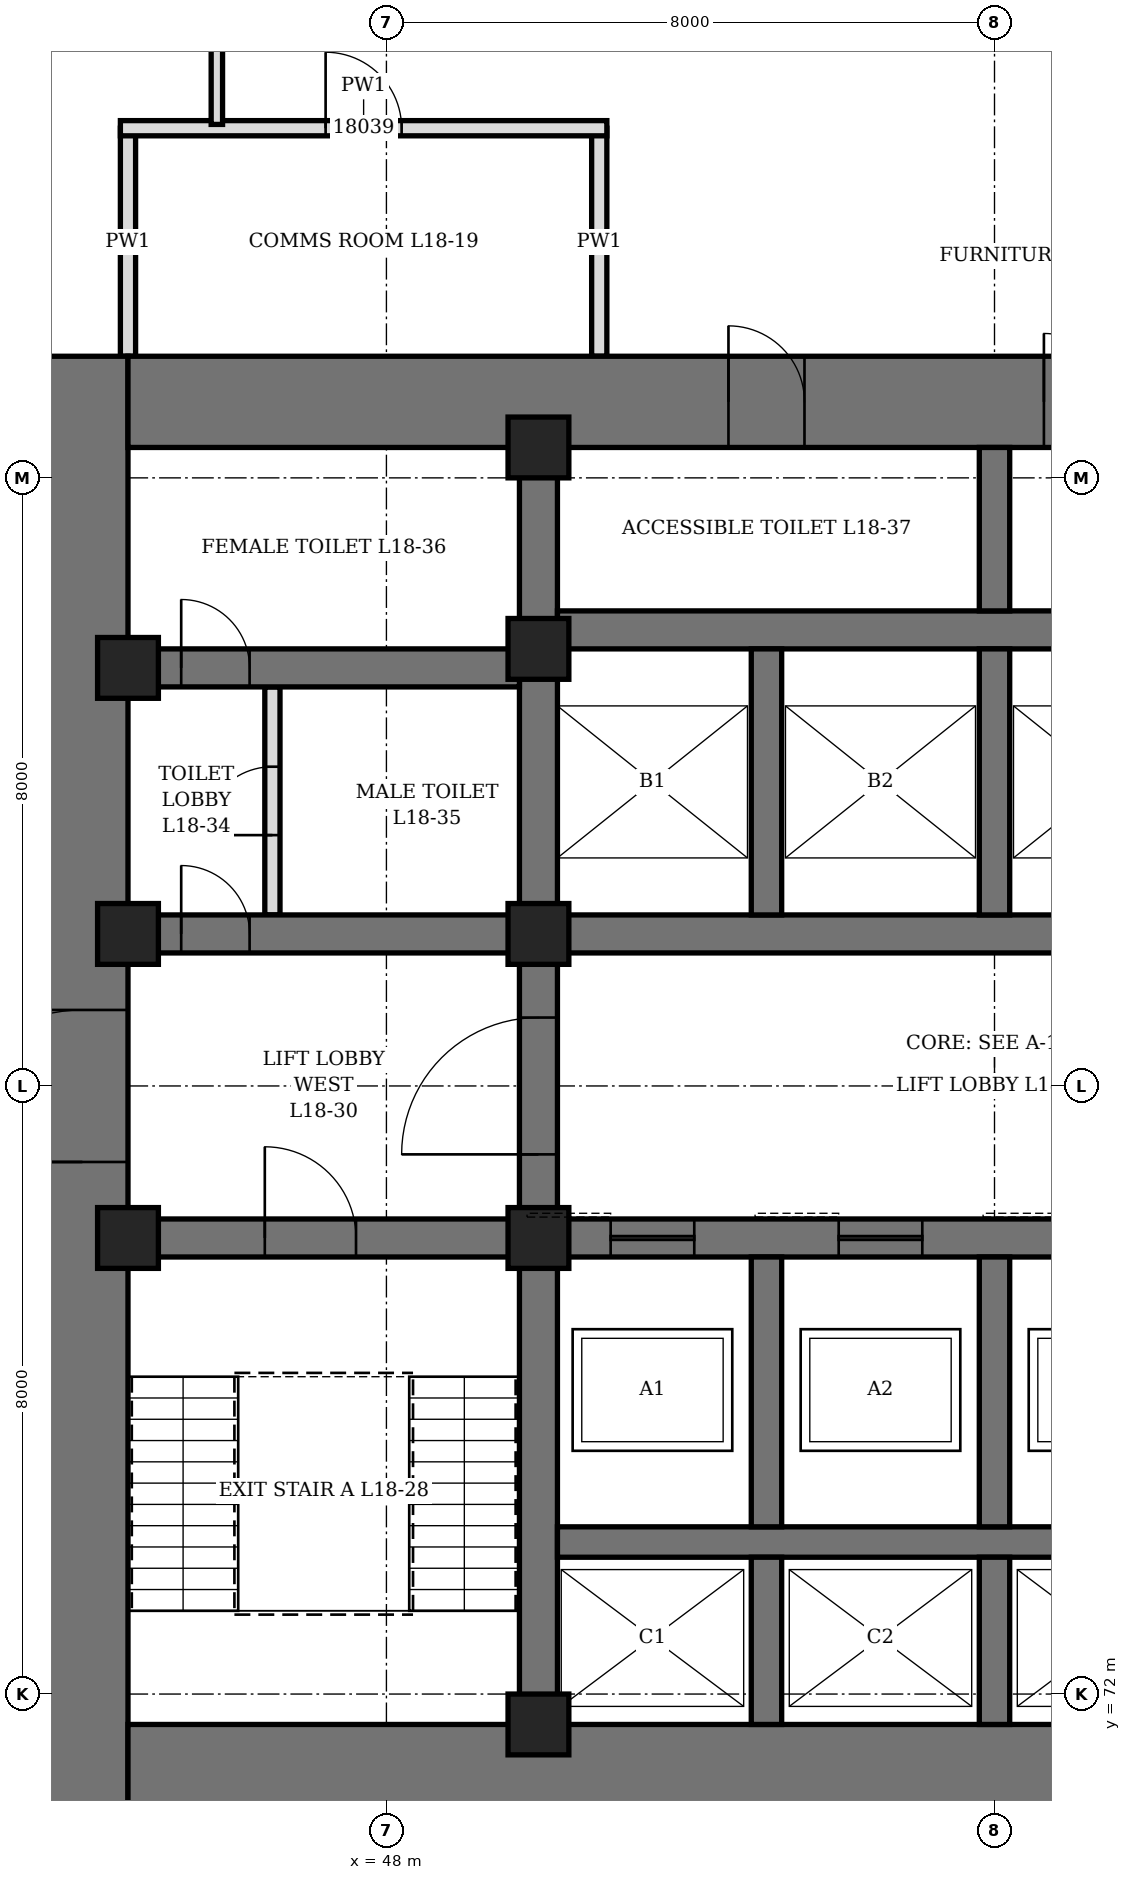
"""IFC4 building model, lengths in metres.
Left out: names, types, materials, properties, quantities, classifications, styles, units other than length and angle.
Written with IfcOpenShell. Run it as: python <this file> out.ifc"""

import sys

from ifc_helpers import new_model, si_unit, direction, frame, frame_2d, origin, origin_2d, place, context, subcontext, project, spatial, rectangle, hollow_rectangle, extrude, element, fill, save


model = new_model("IFC4")
c1 = context("Model", 3, precision=1e-05, world=origin(), true_north=direction((0.0, 1.0)))
c2 = subcontext(c1, "Body", "Model", "MODEL_VIEW")
j1 = project(units=[si_unit("LENGTHUNIT", "METRE"), si_unit("PLANEANGLEUNIT", "RADIAN")], contexts=[c1])
p1 = place(None, origin())
s1 = spatial("IfcSite", under=j1, at=p1, CompositionType="ELEMENT")
p2 = place(p1, origin())
s2 = spatial("IfcBuilding", under=s1, at=p2, CompositionType="ELEMENT")
p3 = place(p2, frame((0.0, 0.0, 85.3)))
s3 = spatial("IfcBuildingStorey", under=s2, at=p3, CompositionType="ELEMENT", Elevation=85.3)
p4 = place(p3, frame((44.0, 70.4, 0.0), z_axis=(0.0, 0.0, 1.0), x_axis=(0.0, 1.0, 0.0)))
e1 = element("IfcWall", 1, at=p4, inside=s3, PredefinedType="SHEAR", context=c2, shape_type="SweptSolid", body=[
    extrude(rectangle(XDim=19.2, YDim=1.2, at=frame_2d((9.6, 0.0))), origin(), (0.0, 0.0, 1.0), 4.2),
])
p5 = place(p4, frame((8.6, 0.0, 0.0)))
e2 = element("IfcOpeningElement", 2, at=p5, cuts=e1, PredefinedType="OPENING", context=c2, shape_type="SweptSolid", body=[
    extrude(rectangle(XDim=2.0, YDim=2.4, at=frame_2d((1.0, 1.2))), frame((0.0, 0.61, 0.0), z_axis=(0.0, -1.0, 0.0), x_axis=(1.0, 0.0, 0.0)), (0.0, 0.0, 1.0), 1.22),
])
p6 = place(p3, frame((44.6, 71.0, 0.0), z_axis=(0.0, 0.0, 1.0), x_axis=(1.0, 0.0, 0.0)))
e3 = element("IfcWall", 3, at=p6, inside=s3, PredefinedType="SHEAR", context=c2, shape_type="SweptSolid", body=[
    extrude(rectangle(XDim=22.8, YDim=1.2, at=frame_2d((11.4, 0.0))), origin(), (0.0, 0.0, 1.0), 4.2),
])
p7 = place(p3, frame((44.6, 89.0, 0.0), z_axis=(0.0, 0.0, 1.0), x_axis=(1.0, 0.0, 0.0)))
e4 = element("IfcWall", 4, at=p7, inside=s3, PredefinedType="SHEAR", context=c2, shape_type="SweptSolid", body=[
    extrude(rectangle(XDim=22.8, YDim=1.2, at=frame_2d((11.4, 0.0))), origin(), (0.0, 0.0, 1.0), 4.2),
])
p8 = place(p7, frame((7.9, 0.0, 0.0)))
e5 = element("IfcOpeningElement", 5, at=p8, cuts=e4, PredefinedType="OPENING", context=c2, shape_type="SweptSolid", body=[
    extrude(rectangle(XDim=1.0, YDim=2.1, at=frame_2d((0.5, 1.05))), frame((0.0, 0.61, 0.0), z_axis=(0.0, -1.0, 0.0), x_axis=(1.0, 0.0, 0.0)), (0.0, 0.0, 1.0), 1.22),
])
p9 = place(p7, frame((12.05, 0.0, 0.0)))
e6 = element("IfcOpeningElement", 6, at=p9, cuts=e4, PredefinedType="OPENING", context=c2, shape_type="SweptSolid", body=[
    extrude(rectangle(XDim=0.9, YDim=2.1, at=frame_2d((0.45, 1.05))), frame((0.0, 0.61, 0.0), z_axis=(0.0, -1.0, 0.0), x_axis=(1.0, 0.0, 0.0)), (0.0, 0.0, 1.0), 1.22),
])
p10 = place(p7, frame((13.975, 0.0, 0.0)))
e7 = element("IfcOpeningElement", 7, at=p10, cuts=e4, PredefinedType="OPENING", context=c2, shape_type="SweptSolid", body=[
    extrude(rectangle(XDim=0.9, YDim=2.1, at=frame_2d((0.45, 1.05))), frame((0.0, 0.61, 0.0), z_axis=(0.0, -1.0, 0.0), x_axis=(1.0, 0.0, 0.0)), (0.0, 0.0, 1.0), 1.22),
])
p11 = place(p3, frame((50.0, 71.6, 0.0), z_axis=(0.0, 0.0, 1.0), x_axis=(0.0, 1.0, 0.0)))
e8 = element("IfcWall", 8, at=p11, inside=s3, PredefinedType="SHEAR", context=c2, shape_type="SweptSolid", body=[
    extrude(rectangle(XDim=16.8, YDim=0.5, at=frame_2d((8.4, 0.0))), origin(), (0.0, 0.0, 1.0), 4.2),
])
p12 = place(p11, frame((7.5, 0.0, 0.0)))
e9 = element("IfcOpeningElement", 9, at=p12, cuts=e8, PredefinedType="OPENING", context=c2, shape_type="SweptSolid", body=[
    extrude(rectangle(XDim=1.8, YDim=2.4, at=frame_2d((0.9, 1.2))), frame((0.0, 0.26, 0.0), z_axis=(0.0, -1.0, 0.0), x_axis=(1.0, 0.0, 0.0)), (0.0, 0.0, 1.0), 0.52),
])
p13 = place(p3, frame((44.6, 78.0, 0.0), z_axis=(0.0, 0.0, 1.0), x_axis=(1.0, 0.0, 0.0)))
e10 = element("IfcWall", 10, at=p13, inside=s3, PredefinedType="SHEAR", context=c2, shape_type="SweptSolid", body=[
    extrude(rectangle(XDim=5.15, YDim=0.5, at=frame_2d((2.575, 0.0))), origin(), (0.0, 0.0, 1.0), 4.2),
])
p14 = place(p13, frame((1.8, 0.0, 0.0)))
e11 = element("IfcOpeningElement", 11, at=p14, cuts=e10, PredefinedType="OPENING", context=c2, shape_type="SweptSolid", body=[
    extrude(rectangle(XDim=1.2, YDim=2.1, at=frame_2d((0.6, 1.05))), frame((0.0, 0.26, 0.0), z_axis=(0.0, -1.0, 0.0), x_axis=(1.0, 0.0, 0.0)), (0.0, 0.0, 1.0), 0.52),
])
p15 = place(p3, frame((44.6, 82.0, 0.0), z_axis=(0.0, 0.0, 1.0), x_axis=(1.0, 0.0, 0.0)))
e12 = element("IfcWall", 12, at=p15, inside=s3, PredefinedType="SHEAR", context=c2, shape_type="SweptSolid", body=[
    extrude(rectangle(XDim=5.15, YDim=0.5, at=frame_2d((2.575, 0.0))), origin(), (0.0, 0.0, 1.0), 4.2),
])
p16 = place(p15, frame((0.7, 0.0, 0.0)))
e13 = element("IfcOpeningElement", 13, at=p16, cuts=e12, PredefinedType="OPENING", context=c2, shape_type="SweptSolid", body=[
    extrude(rectangle(XDim=0.9, YDim=2.1, at=frame_2d((0.45, 1.05))), frame((0.0, 0.26, 0.0), z_axis=(0.0, -1.0, 0.0), x_axis=(1.0, 0.0, 0.0)), (0.0, 0.0, 1.0), 0.52),
])
p17 = place(p3, frame((44.6, 85.5, 0.0), z_axis=(0.0, 0.0, 1.0), x_axis=(1.0, 0.0, 0.0)))
e14 = element("IfcWall", 14, at=p17, inside=s3, PredefinedType="SHEAR", context=c2, shape_type="SweptSolid", body=[
    extrude(rectangle(XDim=5.15, YDim=0.5, at=frame_2d((2.575, 0.0))), origin(), (0.0, 0.0, 1.0), 4.2),
])
p18 = place(p17, frame((0.7, 0.0, 0.0)))
e15 = element("IfcOpeningElement", 15, at=p18, cuts=e14, PredefinedType="OPENING", context=c2, shape_type="SweptSolid", body=[
    extrude(rectangle(XDim=0.9, YDim=2.1, at=frame_2d((0.45, 1.05))), frame((0.0, 0.26, 0.0), z_axis=(0.0, -1.0, 0.0), x_axis=(1.0, 0.0, 0.0)), (0.0, 0.0, 1.0), 0.52),
])
p19 = place(p3, frame((50.25, 78.0, 0.0), z_axis=(0.0, 0.0, 1.0), x_axis=(1.0, 0.0, 0.0)))
e16 = element("IfcWall", 16, at=p19, inside=s3, PredefinedType="SHEAR", context=c2, shape_type="SweptSolid", body=[
    extrude(rectangle(XDim=11.5, YDim=0.5, at=frame_2d((5.75, 0.0))), origin(), (0.0, 0.0, 1.0), 4.2),
])
p20 = place(p19, frame((0.7, 0.0, 0.0)))
e17 = element("IfcOpeningElement", 17, at=p20, cuts=e16, PredefinedType="OPENING", context=c2, shape_type="SweptSolid", body=[
    extrude(rectangle(XDim=1.1, YDim=2.2, at=frame_2d((0.55, 1.1))), frame((0.0, 0.26, 0.0), z_axis=(0.0, -1.0, 0.0), x_axis=(1.0, 0.0, 0.0)), (0.0, 0.0, 1.0), 0.52),
])
p21 = place(p19, frame((3.7, 0.0, 0.0)))
e18 = element("IfcOpeningElement", 18, at=p21, cuts=e16, PredefinedType="OPENING", context=c2, shape_type="SweptSolid", body=[
    extrude(rectangle(XDim=1.1, YDim=2.2, at=frame_2d((0.55, 1.1))), frame((0.0, 0.26, 0.0), z_axis=(0.0, -1.0, 0.0), x_axis=(1.0, 0.0, 0.0)), (0.0, 0.0, 1.0), 0.52),
])
p22 = place(p19, frame((6.7, 0.0, 0.0)))
e19 = element("IfcOpeningElement", 19, at=p22, cuts=e16, PredefinedType="OPENING", context=c2, shape_type="SweptSolid", body=[
    extrude(rectangle(XDim=1.1, YDim=2.2, at=frame_2d((0.55, 1.1))), frame((0.0, 0.26, 0.0), z_axis=(0.0, -1.0, 0.0), x_axis=(1.0, 0.0, 0.0)), (0.0, 0.0, 1.0), 0.52),
])
p23 = place(p19, frame((9.7, 0.0, 0.0)))
e20 = element("IfcOpeningElement", 20, at=p23, cuts=e16, PredefinedType="OPENING", context=c2, shape_type="SweptSolid", body=[
    extrude(rectangle(XDim=1.1, YDim=2.2, at=frame_2d((0.55, 1.1))), frame((0.0, 0.26, 0.0), z_axis=(0.0, -1.0, 0.0), x_axis=(1.0, 0.0, 0.0)), (0.0, 0.0, 1.0), 0.52),
])
for number, where, z_axis, x_axis in (
    (21, (50.25, 82.0, 0.0), (0.0, 0.0, 1.0), (1.0, 0.0, 0.0)),
    (22, (50.25, 86.0, 0.0), (0.0, 0.0, 1.0), (1.0, 0.0, 0.0)),
):
    element("IfcWall", number, at=place(p3, frame(where, z_axis=z_axis, x_axis=x_axis)), inside=s3, PredefinedType="SHEAR", context=c2, shape_type="SweptSolid", body=[
        extrude(rectangle(XDim=11.5, YDim=0.5, at=frame_2d((5.75, 0.0))), origin(), (0.0, 0.0, 1.0), 4.2),
    ])
p24 = place(p3, frame((50.25, 74.0, 0.0), z_axis=(0.0, 0.0, 1.0), x_axis=(1.0, 0.0, 0.0)))
e23 = element("IfcWall", 23, at=p24, inside=s3, PredefinedType="SHEAR", context=c2, shape_type="SweptSolid", body=[
    extrude(rectangle(XDim=11.5, YDim=0.4, at=frame_2d((5.75, 0.0))), origin(), (0.0, 0.0, 1.0), 4.2),
])
p25 = place(p3, frame((53.0, 71.6, 0.0), z_axis=(0.0, 0.0, 1.0), x_axis=(0.0, 1.0, 0.0)))
e24 = element("IfcWall", 24, at=p25, inside=s3, PredefinedType="SHEAR", context=c2, shape_type="SweptSolid", body=[
    extrude(rectangle(XDim=2.2, YDim=0.4, at=frame_2d((1.1, 0.0))), origin(), (0.0, 0.0, 1.0), 4.2),
])
p26 = place(p3, frame((53.0, 74.2, 0.0), z_axis=(0.0, 0.0, 1.0), x_axis=(0.0, 1.0, 0.0)))
e25 = element("IfcWall", 25, at=p26, inside=s3, PredefinedType="SHEAR", context=c2, shape_type="SweptSolid", body=[
    extrude(rectangle(XDim=3.55, YDim=0.4, at=frame_2d((1.775, 0.0))), origin(), (0.0, 0.0, 1.0), 4.2),
])
p27 = place(p3, frame((53.0, 82.25, 0.0), z_axis=(0.0, 0.0, 1.0), x_axis=(0.0, 1.0, 0.0)))
e26 = element("IfcWall", 26, at=p27, inside=s3, PredefinedType="SHEAR", context=c2, shape_type="SweptSolid", body=[
    extrude(rectangle(XDim=3.5, YDim=0.4, at=frame_2d((1.75, 0.0))), origin(), (0.0, 0.0, 1.0), 4.2),
])
p28 = place(p3, frame((56.0, 71.6, 0.0), z_axis=(0.0, 0.0, 1.0), x_axis=(0.0, 1.0, 0.0)))
e27 = element("IfcWall", 27, at=p28, inside=s3, PredefinedType="SHEAR", context=c2, shape_type="SweptSolid", body=[
    extrude(rectangle(XDim=2.2, YDim=0.4, at=frame_2d((1.1, 0.0))), origin(), (0.0, 0.0, 1.0), 4.2),
])
p29 = place(p3, frame((56.0, 74.2, 0.0), z_axis=(0.0, 0.0, 1.0), x_axis=(0.0, 1.0, 0.0)))
e28 = element("IfcWall", 28, at=p29, inside=s3, PredefinedType="SHEAR", context=c2, shape_type="SweptSolid", body=[
    extrude(rectangle(XDim=3.55, YDim=0.4, at=frame_2d((1.775, 0.0))), origin(), (0.0, 0.0, 1.0), 4.2),
])
p30 = place(p3, frame((56.0, 82.25, 0.0), z_axis=(0.0, 0.0, 1.0), x_axis=(0.0, 1.0, 0.0)))
e29 = element("IfcWall", 29, at=p30, inside=s3, PredefinedType="SHEAR", context=c2, shape_type="SweptSolid", body=[
    extrude(rectangle(XDim=3.5, YDim=0.4, at=frame_2d((1.75, 0.0))), origin(), (0.0, 0.0, 1.0), 4.2),
])
p31 = place(p3, frame((56.0, 86.25, 0.0), z_axis=(0.0, 0.0, 1.0), x_axis=(0.0, 1.0, 0.0)))
e30 = element("IfcWall", 30, at=p31, inside=s3, PredefinedType="SHEAR", context=c2, shape_type="SweptSolid", body=[
    extrude(rectangle(XDim=2.15, YDim=0.4, at=frame_2d((1.075, 0.0))), origin(), (0.0, 0.0, 1.0), 4.2),
])
for number, where, z_axis, x_axis in (
    (31, (44.6, 78.0, 0.0), (0.0, 0.0, 1.0), (1.0, 0.0, 0.0)),
    (32, (44.6, 82.0, 0.0), (0.0, 0.0, 1.0), (1.0, 0.0, 0.0)),
    (33, (44.6, 85.5, 0.0), (0.0, 0.0, 1.0), (1.0, 0.0, 0.0)),
    (34, (50.0, 71.6, 0.0), (0.0, 0.0, 1.0), (1.0, 0.0, 0.0)),
    (35, (50.0, 78.0, 0.0), (0.0, 0.0, 1.0), (1.0, 0.0, 0.0)),
    (36, (50.0, 82.0, 0.0), (0.0, 0.0, 1.0), (1.0, 0.0, 0.0)),
    (37, (50.0, 85.75, 0.0), (0.0, 0.0, 1.0), (1.0, 0.0, 0.0)),
    (38, (50.0, 88.4, 0.0), (0.0, 0.0, 1.0), (1.0, 0.0, 0.0)),
):
    element("IfcColumn", number, at=place(p3, frame(where, z_axis=z_axis, x_axis=x_axis)), inside=s3, PredefinedType="COLUMN", context=c2, shape_type="SweptSolid", body=[
        extrude(hollow_rectangle(XDim=0.8, YDim=0.8, WallThickness=0.1, at=origin_2d()), origin(), (0.0, 0.0, 1.0), 4.2),
    ])
p32 = place(p3, frame((46.5, 82.25, 0.0), z_axis=(0.0, 0.0, 1.0), x_axis=(0.0, 1.0, 0.0)))
e39 = element("IfcWall", 39, at=p32, inside=s3, PredefinedType="PARTITIONING", context=c2, shape_type="SweptSolid", body=[
    extrude(rectangle(XDim=3.0, YDim=0.2, at=frame_2d((1.5, 0.0))), origin(), (0.0, 0.0, 1.0), 4.04),
])
p33 = place(p32, frame((1.05, 0.0, 0.0)))
e40 = element("IfcOpeningElement", 40, at=p33, cuts=e39, PredefinedType="OPENING", context=c2, shape_type="SweptSolid", body=[
    extrude(rectangle(XDim=0.9, YDim=2.1, at=frame_2d((0.45, 1.05))), frame((0.0, 0.11, 0.0), z_axis=(0.0, -1.0, 0.0), x_axis=(1.0, 0.0, 0.0)), (0.0, 0.0, 1.0), 0.22),
])
for number, where, z_axis, x_axis in (
    (41, (44.6, 89.6, 0.0), (0.0, 0.0, 1.0), (0.0, 1.0, 0.0)),
    (42, (50.8, 89.6, 0.0), (0.0, 0.0, 1.0), (0.0, 1.0, 0.0)),
):
    element("IfcWall", number, at=place(p3, frame(where, z_axis=z_axis, x_axis=x_axis)), inside=s3, PredefinedType="PARTITIONING", context=c2, shape_type="SweptSolid", body=[
        extrude(rectangle(XDim=3.0, YDim=0.2, at=frame_2d((1.5, 0.0))), origin(), (0.0, 0.0, 1.0), 4.04),
    ])
p34 = place(p3, frame((44.5, 92.6, 0.0), z_axis=(0.0, 0.0, 1.0), x_axis=(1.0, 0.0, 0.0)))
e43 = element("IfcWall", 43, at=p34, inside=s3, PredefinedType="PARTITIONING", context=c2, shape_type="SweptSolid", body=[
    extrude(rectangle(XDim=6.4, YDim=0.2, at=frame_2d((3.2, 0.0))), origin(), (0.0, 0.0, 1.0), 4.04),
])
p35 = place(p34, frame((2.7, 0.0, 0.0)))
e44 = element("IfcOpeningElement", 44, at=p35, cuts=e43, PredefinedType="OPENING", context=c2, shape_type="SweptSolid", body=[
    extrude(rectangle(XDim=1.0, YDim=2.1, at=frame_2d((0.5, 1.05))), frame((0.0, 0.11, 0.0), z_axis=(0.0, -1.0, 0.0), x_axis=(1.0, 0.0, 0.0)), (0.0, 0.0, 1.0), 0.22),
])
p36 = place(p3, frame((45.769, 92.65, 0.0), z_axis=(0.0, 0.0, 1.0), x_axis=(0.0, 1.0, 0.0)))
e45 = element("IfcWall", 45, at=p36, inside=s3, PredefinedType="PARTITIONING", context=c2, shape_type="SweptSolid", body=[
    extrude(rectangle(XDim=12.04, YDim=0.15, at=frame_2d((6.02, 0.0))), origin(), (0.0, 0.0, 1.0), 3.278),
])
p37 = place(p36, frame((5.52, 0.0, 0.0)))
e46 = element("IfcOpeningElement", 46, at=p37, cuts=e45, PredefinedType="OPENING", context=c2, shape_type="SweptSolid", body=[
    extrude(rectangle(XDim=1.0, YDim=2.4, at=frame_2d((0.5, 1.2))), frame((0.0, 0.085, 0.0), z_axis=(0.0, -1.0, 0.0), x_axis=(1.0, 0.0, 0.0)), (0.0, 0.0, 1.0), 0.17),
])
p38 = place(p16, origin())
e47 = element("IfcDoor", 47, at=p38, inside=s3, OperationType="SINGLE_SWING_LEFT", PredefinedType="DOOR", context=c2, shape_type="SweptSolid", body=[
    extrude(rectangle(XDim=0.9, YDim=2.1, at=frame_2d((0.45, 1.05))), frame((0.0, 0.25, 0.0), z_axis=(0.0, -1.0, 0.0), x_axis=(1.0, 0.0, 0.0)), (0.0, 0.0, 1.0), 0.5),
])
fill(e13, e47)
p39 = place(p33, origin())
e48 = element("IfcDoor", 48, at=p39, inside=s3, OperationType="SINGLE_SWING_RIGHT", PredefinedType="DOOR", context=c2, shape_type="SweptSolid", body=[
    extrude(rectangle(XDim=0.9, YDim=2.1, at=frame_2d((0.45, 1.05))), frame((0.0, 0.1, 0.0), z_axis=(0.0, -1.0, 0.0), x_axis=(1.0, 0.0, 0.0)), (0.0, 0.0, 1.0), 0.199),
])
fill(e40, e48)
p40 = place(p18, origin())
e49 = element("IfcDoor", 49, at=p40, inside=s3, OperationType="SINGLE_SWING_RIGHT", PredefinedType="DOOR", context=c2, shape_type="SweptSolid", body=[
    extrude(rectangle(XDim=0.9, YDim=2.1, at=frame_2d((0.45, 1.05))), frame((0.0, 0.25, 0.0), z_axis=(0.0, -1.0, 0.0), x_axis=(1.0, 0.0, 0.0)), (0.0, 0.0, 1.0), 0.5),
])
fill(e15, e49)
p41 = place(p8, origin())
e50 = element("IfcDoor", 50, at=p41, inside=s3, OperationType="SINGLE_SWING_LEFT", PredefinedType="DOOR", context=c2, shape_type="SweptSolid", body=[
    extrude(rectangle(XDim=1.0, YDim=2.1, at=frame_2d((0.5, 1.05))), frame((0.0, 0.35, 0.0), z_axis=(0.0, -1.0, 0.0), x_axis=(1.0, 0.0, 0.0)), (0.0, 0.0, 1.0), 0.7),
])
fill(e5, e50)
p42 = place(p9, origin())
e51 = element("IfcDoor", 51, at=p42, inside=s3, OperationType="SINGLE_SWING_LEFT", PredefinedType="DOOR", context=c2, shape_type="SweptSolid", body=[
    extrude(rectangle(XDim=0.9, YDim=2.1, at=frame_2d((0.45, 1.05))), frame((0.0, 0.35, 0.0), z_axis=(0.0, -1.0, 0.0), x_axis=(1.0, 0.0, 0.0)), (0.0, 0.0, 1.0), 0.7),
])
fill(e6, e51)
p43 = place(p14, origin())
e52 = element("IfcDoor", 52, at=p43, inside=s3, OperationType="SINGLE_SWING_LEFT", PredefinedType="DOOR", context=c2, shape_type="SweptSolid", body=[
    extrude(rectangle(XDim=1.2, YDim=2.1, at=frame_2d((0.6, 1.05))), frame((0.0, 0.25, 0.0), z_axis=(0.0, -1.0, 0.0), x_axis=(1.0, 0.0, 0.0)), (0.0, 0.0, 1.0), 0.5),
])
fill(e11, e52)
p44 = place(p5, origin())
e53 = element("IfcDoor", 53, at=p44, inside=s3, OperationType="DOUBLE_DOOR_SINGLE_SWING", PredefinedType="DOOR", context=c2, shape_type="SweptSolid", body=[
    extrude(rectangle(XDim=2.0, YDim=2.4, at=frame_2d((1.0, 1.2))), frame((0.0, 0.35, 0.0), z_axis=(0.0, -1.0, 0.0), x_axis=(1.0, 0.0, 0.0)), (0.0, 0.0, 1.0), 0.7),
])
fill(e2, e53)
p45 = place(p12, origin())
e54 = element("IfcDoor", 54, at=p45, inside=s3, OperationType="DOUBLE_DOOR_SINGLE_SWING", PredefinedType="DOOR", context=c2, shape_type="SweptSolid", body=[
    extrude(rectangle(XDim=1.8, YDim=2.4, at=frame_2d((0.9, 1.2))), frame((0.0, 0.25, 0.0), z_axis=(0.0, -1.0, 0.0), x_axis=(1.0, 0.0, 0.0)), (0.0, 0.0, 1.0), 0.5),
])
fill(e9, e54)
p46 = place(p20, origin())
e55 = element("IfcDoor", 55, at=p46, inside=s3, OperationType="SLIDING_TO_LEFT", PredefinedType="DOOR", context=c2, shape_type="SweptSolid", body=[
    extrude(rectangle(XDim=1.1, YDim=2.2, at=frame_2d((0.55, 1.1))), frame((0.0, 0.25, 0.0), z_axis=(0.0, -1.0, 0.0), x_axis=(1.0, 0.0, 0.0)), (0.0, 0.0, 1.0), 0.5),
])
fill(e17, e55)
p47 = place(p21, origin())
e56 = element("IfcDoor", 56, at=p47, inside=s3, OperationType="SLIDING_TO_LEFT", PredefinedType="DOOR", context=c2, shape_type="SweptSolid", body=[
    extrude(rectangle(XDim=1.1, YDim=2.2, at=frame_2d((0.55, 1.1))), frame((0.0, 0.25, 0.0), z_axis=(0.0, -1.0, 0.0), x_axis=(1.0, 0.0, 0.0)), (0.0, 0.0, 1.0), 0.5),
])
fill(e18, e56)
p48 = place(p35, origin())
e57 = element("IfcDoor", 57, at=p48, inside=s3, OperationType="SINGLE_SWING_LEFT", PredefinedType="DOOR", context=c2, shape_type="SweptSolid", body=[
    extrude(rectangle(XDim=1.0, YDim=2.1, at=frame_2d((0.5, 1.05))), frame((0.0, 0.1, 0.0), z_axis=(0.0, -1.0, 0.0), x_axis=(1.0, 0.0, 0.0)), (0.0, 0.0, 1.0), 0.199),
])
fill(e44, e57)
save(model, sys.argv[1])
